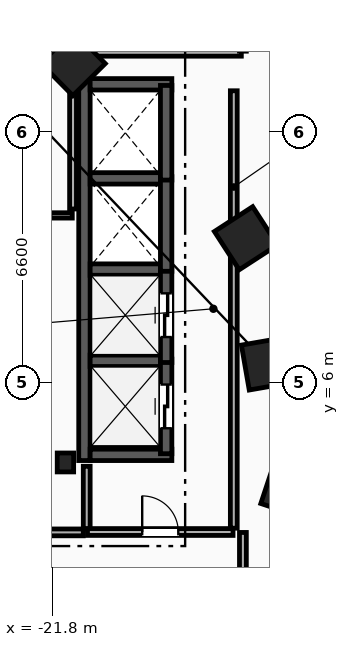
"""IFC4 building model, lengths in metres.
Left out: names, types, materials, properties, quantities, classifications, styles, units other than length and angle.
Written with IfcOpenShell. Run it as: python <this file> out.ifc"""

import sys

from ifc_helpers import new_model, si_unit, direction, frame, frame_2d, origin, origin_2d, place, context, subcontext, project, spatial, rectangle, i_section, extrude, element, fill, save


model = new_model("IFC4")
c1 = context("Model", 3, precision=1e-05, world=origin(), true_north=direction((0.0, 1.0)))
c2 = subcontext(c1, "Body", "Model", "MODEL_VIEW")
j1 = project(units=[si_unit("LENGTHUNIT", "METRE"), si_unit("PLANEANGLEUNIT", "RADIAN")], contexts=[c1])
p1 = place(None, origin())
s1 = spatial("IfcSite", under=j1, at=p1, CompositionType="ELEMENT")
p2 = place(p1, origin())
s2 = spatial("IfcBuilding", under=s1, at=p2, CompositionType="ELEMENT")
p3 = place(p2, frame((0.0, 0.0, 43.0)))
s3 = spatial("IfcBuildingStorey", under=s2, at=p3, CompositionType="ELEMENT", Elevation=43.0)
p4 = place(p3, frame((-21.45, 3.9, 0.0), z_axis=(0.0, 0.0, 1.0), x_axis=(1.0, 0.0, 0.0)))
e1 = element("IfcColumn", 1, at=p4, inside=s3, PredefinedType="COLUMN", context=c2, shape_type="SweptSolid", body=[
    extrude(i_section(OverallWidth=0.432, OverallDepth=0.498, WebThickness=0.056, FlangeThickness=0.089, FilletRadius=0.018, at=origin_2d()), origin(), (0.0, 0.0, 1.0), 3.8),
])
for number, where, z_axis, x_axis in (
    (2, (-15.55, 3.2, 0.0), (0.0, 0.0, 1.0), (0.315, 0.949, 0.0)),
    (3, (-16.125, 6.5, 0.0), (0.0, 0.0, 1.0), (-0.172, 0.985, 0.0)),
    (4, (-16.7, 9.8, 0.0), (0.0, 0.0, 1.0), (-0.544, 0.839, 0.0)),
    (5, (-21.25, 14.4, 0.0), (0.0, 0.0, 1.0), (-0.703, 0.711, 0.0)),
):
    element("IfcColumn", number, at=place(p3, frame(where, z_axis=z_axis, x_axis=x_axis)), inside=s3, PredefinedType="COLUMN", context=c2, shape_type="SweptSolid", body=[
        extrude(rectangle(XDim=1.2, YDim=1.2, at=origin_2d()), origin(), (0.0, 0.0, 1.0), 3.8),
    ])
p5 = place(p3, frame((-20.89, 2.15, 0.0), z_axis=(0.0, 0.0, 1.0), x_axis=(0.0, 1.0, 0.0)))
e6 = element("IfcWall", 6, at=p5, inside=s3, PredefinedType="PARTITIONING", context=c2, shape_type="SweptSolid", body=[
    extrude(rectangle(XDim=1.65, YDim=0.18, at=frame_2d((0.825, 0.0))), origin(), (0.0, 0.0, 1.0), 3.5),
])
p6 = place(p3, frame((-23.98, 2.06, 0.0), z_axis=(0.0, 0.0, 1.0), x_axis=(1.0, 0.0, 0.0)))
e7 = element("IfcWall", 7, at=p6, inside=s3, PredefinedType="PARTITIONING", context=c2, shape_type="SweptSolid", body=[
    extrude(rectangle(XDim=3.0, YDim=0.18, at=frame_2d((1.5, 0.0))), origin(), (0.0, 0.0, 1.0), 3.5),
])
p7 = place(p6, frame((0.9, 0.0, 0.0)))
e8 = element("IfcOpeningElement", 8, at=p7, cuts=e7, PredefinedType="OPENING", context=c2, shape_type="SweptSolid", body=[
    extrude(rectangle(XDim=1.2, YDim=2.15, at=frame_2d((0.6, 1.075))), frame((0.0, 0.1, 0.0), z_axis=(0.0, -1.0, 0.0), x_axis=(1.0, 0.0, 0.0)), (0.0, 0.0, 1.0), 0.2),
])
p8 = place(p3, frame((-20.95, 3.95, 0.0), z_axis=(0.0, 0.0, 1.0), x_axis=(0.0, 1.0, 0.0)))
e9 = element("IfcWall", 9, at=p8, inside=s3, PredefinedType="SHEAR", context=c2, shape_type="SweptSolid", body=[
    extrude(rectangle(XDim=10.05, YDim=0.3, at=frame_2d((5.025, 0.0))), origin(), (0.0, 0.0, 1.0), 3.5),
])
for number, where, z_axis, x_axis in (
    (10, (-20.8, 4.1, 0.0), (0.0, 0.0, 1.0), (1.0, 0.0, 0.0)),
    (11, (-20.8, 13.85, 0.0), (0.0, 0.0, 1.0), (1.0, 0.0, 0.0)),
):
    element("IfcWall", number, at=place(p3, frame(where, z_axis=z_axis, x_axis=x_axis)), inside=s3, PredefinedType="SHEAR", context=c2, shape_type="SweptSolid", body=[
        extrude(rectangle(XDim=2.15, YDim=0.3, at=frame_2d((1.075, 0.0))), origin(), (0.0, 0.0, 1.0), 3.5),
    ])
for number, where, z_axis, x_axis in (
    (12, (-20.8, 6.575, 0.0), (0.0, 0.0, 1.0), (1.0, 0.0, 0.0)),
    (13, (-20.8, 8.975, 0.0), (0.0, 0.0, 1.0), (1.0, 0.0, 0.0)),
    (14, (-20.8, 11.375, 0.0), (0.0, 0.0, 1.0), (1.0, 0.0, 0.0)),
):
    element("IfcWall", number, at=place(p3, frame(where, z_axis=z_axis, x_axis=x_axis)), inside=s3, PredefinedType="SHEAR", context=c2, shape_type="SweptSolid", body=[
        extrude(rectangle(XDim=1.85, YDim=0.3, at=frame_2d((0.925, 0.0))), origin(), (0.0, 0.0, 1.0), 3.5),
    ])
p9 = place(p3, frame((-18.8, 4.13, 0.0), z_axis=(0.0, 0.0, 1.0), x_axis=(0.0, 1.0, 0.0)))
e15 = element("IfcWall", 15, at=p9, inside=s3, PredefinedType="SHEAR", context=c2, shape_type="SweptSolid", body=[
    extrude(rectangle(XDim=2.49, YDim=0.3, at=frame_2d((1.245, 0.0))), origin(), (0.0, 0.0, 1.0), 3.5),
])
p10 = place(p9, frame((0.67, 0.0, 0.0)))
e16 = element("IfcOpeningElement", 16, at=p10, cuts=e15, PredefinedType="OPENING", context=c2, shape_type="SweptSolid", body=[
    extrude(rectangle(XDim=1.15, YDim=2.2, at=frame_2d((0.575, 1.1))), frame((0.0, 0.16, 0.0), z_axis=(0.0, -1.0, 0.0), x_axis=(1.0, 0.0, 0.0)), (0.0, 0.0, 1.0), 0.32),
])
p11 = place(p3, frame((-18.8, 6.53, 0.0), z_axis=(0.0, 0.0, 1.0), x_axis=(0.0, 1.0, 0.0)))
e17 = element("IfcWall", 17, at=p11, inside=s3, PredefinedType="SHEAR", context=c2, shape_type="SweptSolid", body=[
    extrude(rectangle(XDim=2.49, YDim=0.3, at=frame_2d((1.245, 0.0))), origin(), (0.0, 0.0, 1.0), 3.5),
])
p12 = place(p11, frame((0.67, 0.0, 0.0)))
e18 = element("IfcOpeningElement", 18, at=p12, cuts=e17, PredefinedType="OPENING", context=c2, shape_type="SweptSolid", body=[
    extrude(rectangle(XDim=1.15, YDim=2.2, at=frame_2d((0.575, 1.1))), frame((0.0, 0.16, 0.0), z_axis=(0.0, -1.0, 0.0), x_axis=(1.0, 0.0, 0.0)), (0.0, 0.0, 1.0), 0.32),
])
for number, where, z_axis, x_axis in (
    (19, (-18.8, 8.93, 0.0), (0.0, 0.0, 1.0), (0.0, 1.0, 0.0)),
    (20, (-18.8, 11.33, 0.0), (0.0, 0.0, 1.0), (0.0, 1.0, 0.0)),
):
    element("IfcWall", number, at=place(p3, frame(where, z_axis=z_axis, x_axis=x_axis)), inside=s3, PredefinedType="SHEAR", context=c2, shape_type="SweptSolid", body=[
        extrude(rectangle(XDim=2.49, YDim=0.3, at=frame_2d((1.245, 0.0))), origin(), (0.0, 0.0, 1.0), 3.5),
    ])
p13 = place(p3, frame((-17.02, 2.17, 0.0), z_axis=(0.0, 0.0, 1.0), x_axis=(0.0, 1.0, 0.0)))
e21 = element("IfcWall", 21, at=p13, inside=s3, PredefinedType="PARTITIONING", context=c2, shape_type="SweptSolid", body=[
    extrude(rectangle(XDim=11.51, YDim=0.18, at=frame_2d((5.755, 0.0))), origin(), (0.0, 0.0, 1.0), 3.5),
])
p14 = place(p3, frame((-20.87, 2.07, 0.0), z_axis=(0.0, 0.0, 1.0), x_axis=(1.0, 0.0, 0.0)))
e22 = element("IfcWall", 22, at=p14, inside=s3, PredefinedType="PARTITIONING", context=c2, shape_type="SweptSolid", body=[
    extrude(rectangle(XDim=3.83, YDim=0.18, at=frame_2d((1.915, 0.0))), origin(), (0.0, 0.0, 1.0), 3.5),
])
p15 = place(p14, frame((1.44, 0.0, 0.0)))
e23 = element("IfcOpeningElement", 23, at=p15, cuts=e22, PredefinedType="OPENING", context=c2, shape_type="SweptSolid", body=[
    extrude(rectangle(XDim=0.95, YDim=2.1, at=frame_2d((0.475, 1.05))), frame((0.0, 0.1, 0.0), z_axis=(0.0, -1.0, 0.0), x_axis=(1.0, 0.0, 0.0)), (0.0, 0.0, 1.0), 0.2),
])
p16 = place(p3, frame((-21.86, 10.4, 0.0), z_axis=(0.0, 0.0, 1.0), x_axis=(1.0, 0.0, 0.0)))
e24 = element("IfcWall", 24, at=p16, inside=s3, PredefinedType="PARTITIONING", context=c2, shape_type="SweptSolid", body=[
    extrude(rectangle(XDim=0.59, YDim=0.14, at=frame_2d((0.295, 0.0))), origin(), (0.0, 0.0, 1.0), 3.5),
])
p17 = place(p3, frame((-21.25, 10.57, 0.0), z_axis=(0.0, 0.0, 1.0), x_axis=(0.0, 1.0, 0.0)))
e25 = element("IfcWall", 25, at=p17, inside=s3, PredefinedType="PARTITIONING", context=c2, shape_type="SweptSolid", body=[
    extrude(rectangle(XDim=4.36, YDim=0.18, at=frame_2d((2.18, 0.0))), origin(), (0.0, 0.0, 1.0), 3.5),
])
p18 = place(p3, frame((-21.178, 14.68, 0.0), z_axis=(0.0, 0.0, 1.0), x_axis=(1.0, 0.0, 0.0)))
e26 = element("IfcWall", 26, at=p18, inside=s3, PredefinedType="PARTITIONING", context=c2, shape_type="SweptSolid", body=[
    extrude(rectangle(XDim=4.357, YDim=0.18, at=frame_2d((2.178, 0.0))), origin(), (0.0, 0.0, 1.0), 3.5),
])
p19 = place(p3, frame((-16.78, -0.329, 0.0), z_axis=(0.0, 0.0, 1.0), x_axis=(0.0, 1.0, 0.0)))
e27 = element("IfcWall", 27, at=p19, inside=s3, PredefinedType="PARTITIONING", context=c2, shape_type="SweptSolid", body=[
    extrude(rectangle(XDim=2.387, YDim=0.18, at=frame_2d((1.194, 0.0))), origin(), (0.0, 0.0, 1.0), 3.5),
])
p20 = place(p10, origin())
e28 = element("IfcDoor", 28, at=p20, inside=s3, OperationType="SLIDING_TO_LEFT", PredefinedType="TRAPDOOR", context=c2, shape_type="SweptSolid", body=[
    extrude(rectangle(XDim=1.15, YDim=2.2, at=frame_2d((0.575, 1.1))), frame((0.0, 0.025, 0.0), z_axis=(0.0, -1.0, 0.0), x_axis=(1.0, 0.0, 0.0)), (0.0, 0.0, 1.0), 0.05),
])
fill(e16, e28)
p21 = place(p12, origin())
e29 = element("IfcDoor", 29, at=p21, inside=s3, OperationType="SLIDING_TO_LEFT", PredefinedType="TRAPDOOR", context=c2, shape_type="SweptSolid", body=[
    extrude(rectangle(XDim=1.15, YDim=2.2, at=frame_2d((0.575, 1.1))), frame((0.0, 0.025, 0.0), z_axis=(0.0, -1.0, 0.0), x_axis=(1.0, 0.0, 0.0)), (0.0, 0.0, 1.0), 0.05),
])
fill(e18, e29)
p22 = place(p15, origin())
e30 = element("IfcDoor", 30, at=p22, inside=s3, OperationType="SINGLE_SWING_LEFT", PredefinedType="DOOR", context=c2, shape_type="SweptSolid", body=[
    extrude(rectangle(XDim=0.95, YDim=2.1, at=frame_2d((0.475, 1.05))), frame((0.0, 0.025, 0.0), z_axis=(0.0, -1.0, 0.0), x_axis=(1.0, 0.0, 0.0)), (0.0, 0.0, 1.0), 0.05),
])
fill(e23, e30)
save(model, sys.argv[1])
